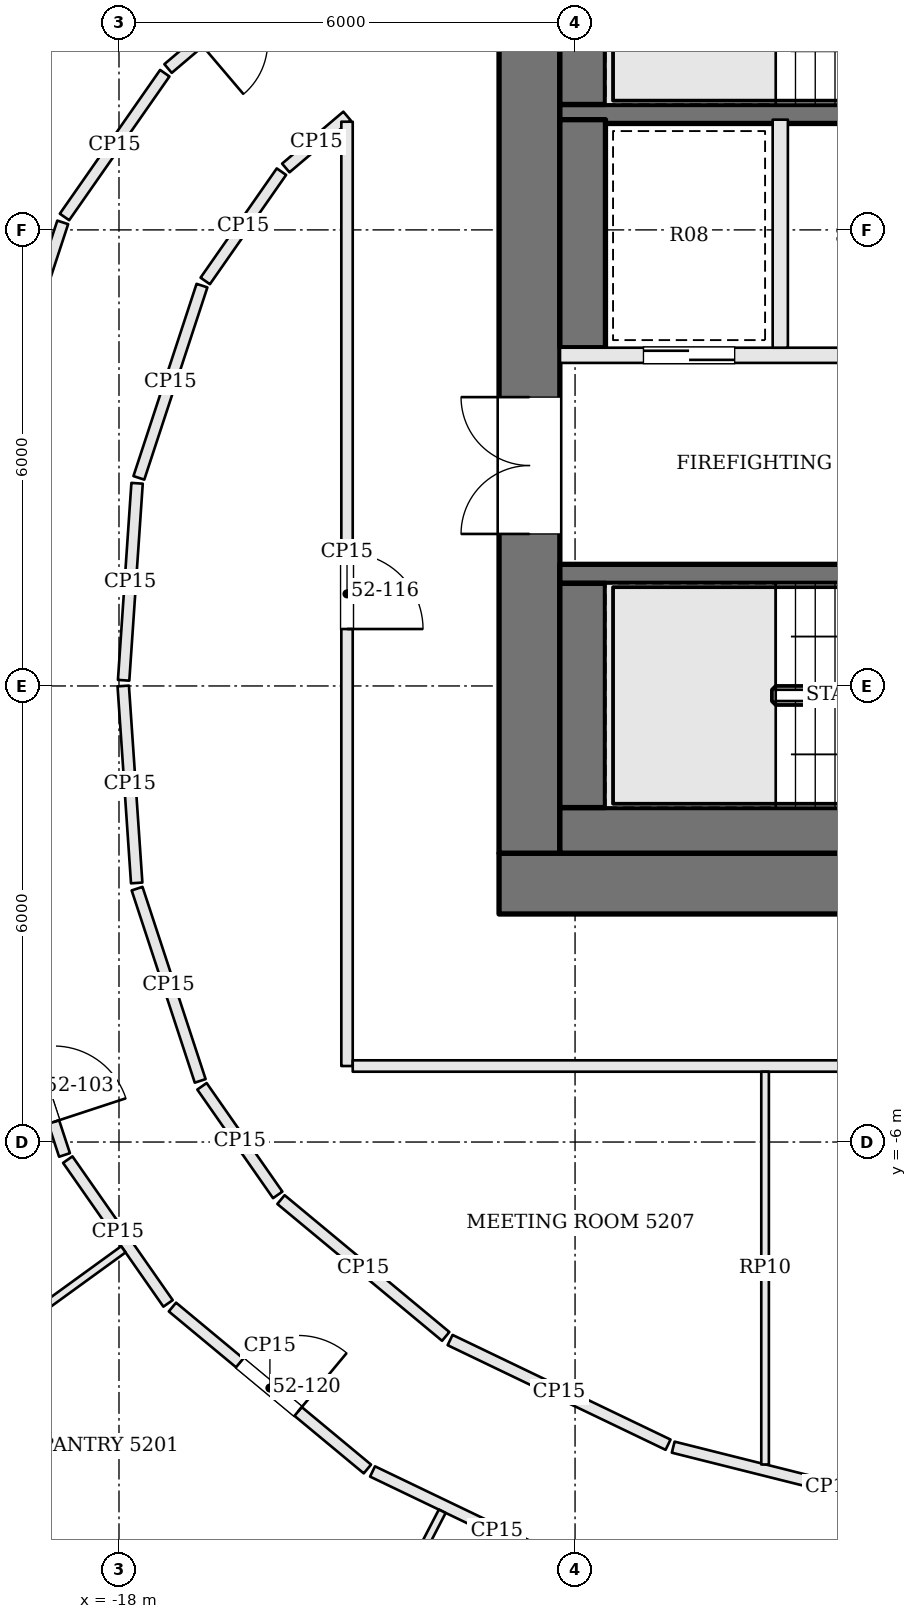
"""IFC4 building model, lengths in metres.
Left out: names, types, materials, properties, quantities, classifications, styles, units other than length and angle.
Written with IfcOpenShell. Run it as: python <this file> out.ifc"""

import sys

from ifc_helpers import new_model, si_unit, direction, frame, frame_2d, origin, place, context, subcontext, project, spatial, rectangle, extrude, element, fill, save


model = new_model("IFC4")
c1 = context("Model", 3, precision=1e-05, world=origin(), true_north=direction((0.0, 1.0)))
c2 = subcontext(c1, "Body", "Model", "MODEL_VIEW")
j1 = project(units=[si_unit("LENGTHUNIT", "METRE"), si_unit("PLANEANGLEUNIT", "RADIAN")], contexts=[c1])
p1 = place(None, origin())
s1 = spatial("IfcSite", under=j1, at=p1, CompositionType="ELEMENT")
p2 = place(p1, origin())
s2 = spatial("IfcBuilding", under=s1, at=p2, CompositionType="ELEMENT")
p3 = place(p2, frame((0.0, 0.0, 213.0)))
s3 = spatial("IfcBuildingStorey", under=s2, at=p3, CompositionType="ELEMENT", Elevation=213.0)
p4 = place(p3, frame((-13.0, -2.6, 0.0), z_axis=(0.0, 0.0, 1.0), x_axis=(1.0, 0.0, 0.0)))
e1 = element("IfcWall", 1, at=p4, inside=s3, PredefinedType="SHEAR", context=c2, shape_type="SweptSolid", body=[
    extrude(rectangle(XDim=26.0, YDim=0.8, at=frame_2d((13.0, 0.0))), origin(), (0.0, 0.0, 1.0), 3.9),
])
p5 = place(p4, frame((8.925, 0.0, 0.0)))
e2 = element("IfcOpeningElement", 2, at=p5, cuts=e1, PredefinedType="OPENING", context=c2, shape_type="SweptSolid", body=[
    extrude(rectangle(XDim=0.9, YDim=2.1, at=frame_2d((0.45, 1.05))), frame((0.0, 0.41, 0.0), z_axis=(0.0, -1.0, 0.0), x_axis=(1.0, 0.0, 0.0)), (0.0, 0.0, 1.0), 0.82),
])
p6 = place(p4, frame((11.475, 0.0, 0.0)))
e3 = element("IfcOpeningElement", 3, at=p6, cuts=e1, PredefinedType="OPENING", context=c2, shape_type="SweptSolid", body=[
    extrude(rectangle(XDim=0.9, YDim=2.1, at=frame_2d((0.45, 1.05))), frame((0.0, 0.41, 0.0), z_axis=(0.0, -1.0, 0.0), x_axis=(1.0, 0.0, 0.0)), (0.0, 0.0, 1.0), 0.82),
])
p7 = place(p4, frame((13.6, 0.0, 0.0)))
e4 = element("IfcOpeningElement", 4, at=p7, cuts=e1, PredefinedType="OPENING", context=c2, shape_type="SweptSolid", body=[
    extrude(rectangle(XDim=1.0, YDim=2.1, at=frame_2d((0.5, 1.05))), frame((0.0, 0.41, 0.0), z_axis=(0.0, -1.0, 0.0), x_axis=(1.0, 0.0, 0.0)), (0.0, 0.0, 1.0), 0.82),
])
p8 = place(p4, frame((15.95, 0.0, 0.0)))
e5 = element("IfcOpeningElement", 5, at=p8, cuts=e1, PredefinedType="OPENING", context=c2, shape_type="SweptSolid", body=[
    extrude(rectangle(XDim=1.0, YDim=2.1, at=frame_2d((0.5, 1.05))), frame((0.0, 0.41, 0.0), z_axis=(0.0, -1.0, 0.0), x_axis=(1.0, 0.0, 0.0)), (0.0, 0.0, 1.0), 0.82),
])
p9 = place(p3, frame((-12.6, -2.2, 0.0), z_axis=(0.0, 0.0, 1.0), x_axis=(0.0, 1.0, 0.0)))
e6 = element("IfcWall", 6, at=p9, inside=s3, PredefinedType="SHEAR", context=c2, shape_type="SweptSolid", body=[
    extrude(rectangle(XDim=13.4, YDim=0.8, at=frame_2d((6.7, 0.0))), origin(), (0.0, 0.0, 1.0), 3.9),
])
p10 = place(p9, frame((4.2, 0.0, 0.0)))
e7 = element("IfcOpeningElement", 7, at=p10, cuts=e6, PredefinedType="OPENING", context=c2, shape_type="SweptSolid", body=[
    extrude(rectangle(XDim=1.8, YDim=2.1, at=frame_2d((0.9, 1.05))), frame((0.0, 0.41, 0.0), z_axis=(0.0, -1.0, 0.0), x_axis=(1.0, 0.0, 0.0)), (0.0, 0.0, 1.0), 0.82),
])
p11 = place(p3, frame((-12.2, 1.475, 0.0), z_axis=(0.0, 0.0, 1.0), x_axis=(1.0, 0.0, 0.0)))
e8 = element("IfcWall", 8, at=p11, inside=s3, PredefinedType="SOLIDWALL", context=c2, shape_type="SweptSolid", body=[
    extrude(rectangle(XDim=7.1, YDim=0.25, at=frame_2d((3.55, 0.0))), origin(), (0.0, 0.0, 1.0), 3.6),
])
p12 = place(p11, frame((5.8, 0.0, 0.0)))
e9 = element("IfcOpeningElement", 9, at=p12, cuts=e8, PredefinedType="OPENING", context=c2, shape_type="SweptSolid", body=[
    extrude(rectangle(XDim=1.2, YDim=2.1, at=frame_2d((0.6, 1.05))), frame((0.0, 0.135, 0.0), z_axis=(0.0, -1.0, 0.0), x_axis=(1.0, 0.0, 0.0)), (0.0, 0.0, 1.0), 0.27),
])
p13 = place(p3, frame((-12.2, 4.35, 0.0), z_axis=(0.0, 0.0, 1.0), x_axis=(1.0, 0.0, 0.0)))
e10 = element("IfcWall", 10, at=p13, inside=s3, PredefinedType="SOLIDWALL", context=c2, shape_type="SweptSolid", body=[
    extrude(rectangle(XDim=7.1, YDim=0.2, at=frame_2d((3.55, 0.0))), origin(), (0.0, 0.0, 1.0), 3.6),
])
p14 = place(p13, frame((4.4, 0.0, 0.0)))
e11 = element("IfcOpeningElement", 11, at=p14, cuts=e10, PredefinedType="OPENING", context=c2, shape_type="SweptSolid", body=[
    extrude(rectangle(XDim=1.2, YDim=2.1, at=frame_2d((0.6, 1.05))), frame((0.0, 0.11, 0.0), z_axis=(0.0, -1.0, 0.0), x_axis=(1.0, 0.0, 0.0)), (0.0, 0.0, 1.0), 0.22),
])
p15 = place(p13, frame((1.1, 0.0, 0.0)))
e12 = element("IfcOpeningElement", 12, at=p15, cuts=e10, PredefinedType="OPENING", context=c2, shape_type="SweptSolid", body=[
    extrude(rectangle(XDim=1.2, YDim=2.1, at=frame_2d((0.6, 1.05))), frame((0.0, 0.11, 0.0), z_axis=(0.0, -1.0, 0.0), x_axis=(1.0, 0.0, 0.0)), (0.0, 0.0, 1.0), 0.22),
])
p16 = place(p3, frame((-12.2, 7.525, 0.0), z_axis=(0.0, 0.0, 1.0), x_axis=(1.0, 0.0, 0.0)))
e13 = element("IfcWall", 13, at=p16, inside=s3, PredefinedType="SOLIDWALL", context=c2, shape_type="SweptSolid", body=[
    extrude(rectangle(XDim=7.1, YDim=0.25, at=frame_2d((3.55, 0.0))), origin(), (0.0, 0.0, 1.0), 3.6),
])
p17 = place(p16, frame((5.8, 0.0, 0.0)))
e14 = element("IfcOpeningElement", 14, at=p17, cuts=e13, PredefinedType="OPENING", context=c2, shape_type="SweptSolid", body=[
    extrude(rectangle(XDim=1.2, YDim=2.1, at=frame_2d((0.6, 1.05))), frame((0.0, 0.135, 0.0), z_axis=(0.0, -1.0, 0.0), x_axis=(1.0, 0.0, 0.0)), (0.0, 0.0, 1.0), 0.27),
])
p18 = place(p3, frame((-9.3, 4.45, 0.0), z_axis=(0.0, 0.0, 1.0), x_axis=(0.0, 1.0, 0.0)))
e15 = element("IfcWall", 15, at=p18, inside=s3, PredefinedType="SOLIDWALL", context=c2, shape_type="SweptSolid", body=[
    extrude(rectangle(XDim=3.0, YDim=0.2, at=frame_2d((1.5, 0.0))), origin(), (0.0, 0.0, 1.0), 3.6),
])
p19 = place(p3, frame((-12.2, -1.9, 0.0), z_axis=(0.0, 0.0, 1.0), x_axis=(1.0, 0.0, 0.0)))
e16 = element("IfcWall", 16, at=p19, inside=s3, PredefinedType="SOLIDWALL", context=c2, shape_type="SweptSolid", body=[
    extrude(rectangle(XDim=7.1, YDim=0.6, at=frame_2d((3.55, 0.0))), origin(), (0.0, 0.0, 1.0), 3.6),
])
p20 = place(p3, frame((-11.9, -1.6, 0.0), z_axis=(0.0, 0.0, 1.0), x_axis=(0.0, 1.0, 0.0)))
e17 = element("IfcWall", 17, at=p20, inside=s3, PredefinedType="SOLIDWALL", context=c2, shape_type="SweptSolid", body=[
    extrude(rectangle(XDim=2.95, YDim=0.6, at=frame_2d((1.475, 0.0))), origin(), (0.0, 0.0, 1.0), 3.6),
])
p21 = place(p3, frame((-11.9, 4.45, 0.0), z_axis=(0.0, 0.0, 1.0), x_axis=(0.0, 1.0, 0.0)))
e18 = element("IfcWall", 18, at=p21, inside=s3, PredefinedType="SOLIDWALL", context=c2, shape_type="SweptSolid", body=[
    extrude(rectangle(XDim=3.0, YDim=0.6, at=frame_2d((1.5, 0.0))), origin(), (0.0, 0.0, 1.0), 3.6),
])
p22 = place(p3, frame((-11.9, 7.65, 0.0), z_axis=(0.0, 0.0, 1.0), x_axis=(0.0, 1.0, 0.0)))
e19 = element("IfcWall", 19, at=p22, inside=s3, PredefinedType="SOLIDWALL", context=c2, shape_type="SweptSolid", body=[
    extrude(rectangle(XDim=2.95, YDim=0.6, at=frame_2d((1.475, 0.0))), origin(), (0.0, 0.0, 1.0), 3.6),
])
p23 = place(p3, frame((-15.057, 10.073, 0.0), z_axis=(0.0, 0.0, 1.0), x_axis=(-0.762398905861, -0.647107339119, 0.0)))
e20 = element("IfcWall", 20, at=p23, inside=s3, PredefinedType="PARTITIONING", context=c2, shape_type="SweptSolid", body=[
    extrude(rectangle(XDim=3.013, YDim=0.15, at=frame_2d((1.507, 0.0))), origin(), (0.0, 0.0, 1.0), 2.984),
])
p24 = place(p23, frame((0.675, 0.0, 0.0)))
e21 = element("IfcOpeningElement", 21, at=p24, cuts=e20, PredefinedType="OPENING", context=c2, shape_type="SweptSolid", body=[
    extrude(rectangle(XDim=1.8, YDim=2.1, at=frame_2d((0.9, 1.05))), frame((0.0, 0.085, 0.0), z_axis=(0.0, -1.0, 0.0), x_axis=(1.0, 0.0, 0.0)), (0.0, 0.0, 1.0), 0.17),
])
p25 = place(p3, frame((-17.397, 8.062, 0.0), z_axis=(0.0, 0.0, 1.0), x_axis=(-0.572118665737, -0.820170855563, 0.0)))
e22 = element("IfcWall", 22, at=p25, inside=s3, PredefinedType="PARTITIONING", context=c2, shape_type="SweptSolid", body=[
    extrude(rectangle(XDim=2.306, YDim=0.15, at=frame_2d((1.153, 0.0))), origin(), (0.0, 0.0, 1.0), 2.984),
])
p26 = place(p3, frame((-18.74, 6.099, 0.0), z_axis=(0.0, 0.0, 1.0), x_axis=(-0.31188427026, -0.950120098706, 0.0)))
e23 = element("IfcWall", 23, at=p26, inside=s3, PredefinedType="PARTITIONING", context=c2, shape_type="SweptSolid", body=[
    extrude(rectangle(XDim=3.206, YDim=0.15, at=frame_2d((1.603, 0.0))), origin(), (0.0, 0.0, 1.0), 2.984),
])
p27 = place(p3, frame((-19.717, -3.124, 0.0), z_axis=(0.0, 0.0, 1.0), x_axis=(0.31188427026, -0.950120098706, 0.0)))
e24 = element("IfcWall", 24, at=p27, inside=s3, PredefinedType="PARTITIONING", context=c2, shape_type="SweptSolid", body=[
    extrude(rectangle(XDim=3.206, YDim=0.15, at=frame_2d((1.603, 0.0))), origin(), (0.0, 0.0, 1.0), 2.984),
])
p28 = place(p27, frame((1.75, 0.0, 0.0)))
e25 = element("IfcOpeningElement", 25, at=p28, cuts=e24, PredefinedType="OPENING", context=c2, shape_type="SweptSolid", body=[
    extrude(rectangle(XDim=1.0, YDim=2.4, at=frame_2d((0.5, 1.2))), frame((0.0, 0.085, 0.0), z_axis=(0.0, -1.0, 0.0), x_axis=(1.0, 0.0, 0.0)), (0.0, 0.0, 1.0), 0.17),
])
p29 = place(p3, frame((-18.674, -6.232, 0.0), z_axis=(0.0, 0.0, 1.0), x_axis=(0.572118665737, -0.820170855563, 0.0)))
e26 = element("IfcWall", 26, at=p29, inside=s3, PredefinedType="PARTITIONING", context=c2, shape_type="SweptSolid", body=[
    extrude(rectangle(XDim=2.306, YDim=0.15, at=frame_2d((1.153, 0.0))), origin(), (0.0, 0.0, 1.0), 2.984),
])
p30 = place(p3, frame((-17.297, -8.171, 0.0), z_axis=(0.0, 0.0, 1.0), x_axis=(0.769228575061, -0.638973707839, 0.0)))
e27 = element("IfcWall", 27, at=p30, inside=s3, PredefinedType="PARTITIONING", context=c2, shape_type="SweptSolid", body=[
    extrude(rectangle(XDim=3.334, YDim=0.15, at=frame_2d((1.667, 0.0))), origin(), (0.0, 0.0, 1.0), 2.984),
])
p31 = place(p30, frame((1.15, 0.0, 0.0)))
e28 = element("IfcOpeningElement", 28, at=p31, cuts=e27, PredefinedType="OPENING", context=c2, shape_type="SweptSolid", body=[
    extrude(rectangle(XDim=1.0, YDim=2.1, at=frame_2d((0.5, 1.05))), frame((0.0, 0.085, 0.0), z_axis=(0.0, -1.0, 0.0), x_axis=(1.0, 0.0, 0.0)), (0.0, 0.0, 1.0), 0.17),
])
p32 = place(p3, frame((-14.664, -10.334, 0.0), z_axis=(0.0, 0.0, 1.0), x_axis=(0.901507315282, -0.432763862278, 0.0)))
e29 = element("IfcWall", 29, at=p32, inside=s3, PredefinedType="PARTITIONING", context=c2, shape_type="SweptSolid", body=[
    extrude(rectangle(XDim=3.63, YDim=0.15, at=frame_2d((1.815, 0.0))), origin(), (0.0, 0.0, 1.0), 2.984),
])
p33 = place(p3, frame((-6.553, -11.056, 0.0), z_axis=(0.0, 0.0, 1.0), x_axis=(-0.970004917182, 0.243085294995, 0.0)))
e30 = element("IfcWall", 30, at=p33, inside=s3, PredefinedType="PARTITIONING", context=c2, shape_type="SweptSolid", body=[
    extrude(rectangle(XDim=4.284, YDim=0.15, at=frame_2d((2.142, 0.0))), origin(), (0.0, 0.0, 1.0), 2.984),
])
p34 = place(p3, frame((-10.776, -9.982, 0.0), z_axis=(0.0, 0.0, 1.0), x_axis=(-0.901511079436, 0.432756020933, 0.0)))
e31 = element("IfcWall", 31, at=p34, inside=s3, PredefinedType="PARTITIONING", context=c2, shape_type="SweptSolid", body=[
    extrude(rectangle(XDim=3.181, YDim=0.15, at=frame_2d((1.59, 0.0))), origin(), (0.0, 0.0, 1.0), 2.984),
])
p35 = place(p3, frame((-13.702, -8.557, 0.0), z_axis=(0.0, 0.0, 1.0), x_axis=(-0.769221825067, 0.638981833733, 0.0)))
e32 = element("IfcWall", 32, at=p35, inside=s3, PredefinedType="PARTITIONING", context=c2, shape_type="SweptSolid", body=[
    extrude(rectangle(XDim=2.817, YDim=0.15, at=frame_2d((1.409, 0.0))), origin(), (0.0, 0.0, 1.0), 2.984),
])
p36 = place(p3, frame((-15.912, -6.696, 0.0), z_axis=(0.0, 0.0, 1.0), x_axis=(-0.572078533763, 0.820198848578, 0.0)))
e33 = element("IfcWall", 33, at=p36, inside=s3, PredefinedType="PARTITIONING", context=c2, shape_type="SweptSolid", body=[
    extrude(rectangle(XDim=1.742, YDim=0.15, at=frame_2d((0.871, 0.0))), origin(), (0.0, 0.0, 1.0), 2.984),
])
p37 = place(p3, frame((-16.932, -5.196, 0.0), z_axis=(0.0, 0.0, 1.0), x_axis=(-0.311904957484, 0.950113307715, 0.0)))
e34 = element("IfcWall", 34, at=p37, inside=s3, PredefinedType="PARTITIONING", context=c2, shape_type="SweptSolid", body=[
    extrude(rectangle(XDim=2.662, YDim=0.15, at=frame_2d((1.331, 0.0))), origin(), (0.0, 0.0, 1.0), 2.984),
])
p38 = place(p3, frame((-17.767, -2.592, 0.0), z_axis=(0.0, 0.0, 1.0), x_axis=(-0.068140828228, 0.997675712608, 0.0)))
e35 = element("IfcWall", 35, at=p38, inside=s3, PredefinedType="PARTITIONING", context=c2, shape_type="SweptSolid", body=[
    extrude(rectangle(XDim=2.598, YDim=0.15, at=frame_2d((1.299, 0.0))), origin(), (0.0, 0.0, 1.0), 2.984),
])
p39 = place(p3, frame((-17.939, 0.075, 0.0), z_axis=(0.0, 0.0, 1.0), x_axis=(0.068227980697, 0.997669756307, 0.0)))
e36 = element("IfcWall", 36, at=p39, inside=s3, PredefinedType="PARTITIONING", context=c2, shape_type="SweptSolid", body=[
    extrude(rectangle(XDim=2.598, YDim=0.15, at=frame_2d((1.299, 0.0))), origin(), (0.0, 0.0, 1.0), 2.984),
])
p40 = place(p3, frame((-17.739, 2.738, 0.0), z_axis=(0.0, 0.0, 1.0), x_axis=(0.311904957484, 0.950113307715, 0.0)))
e37 = element("IfcWall", 37, at=p40, inside=s3, PredefinedType="PARTITIONING", context=c2, shape_type="SweptSolid", body=[
    extrude(rectangle(XDim=2.662, YDim=0.15, at=frame_2d((1.331, 0.0))), origin(), (0.0, 0.0, 1.0), 2.984),
])
p41 = place(p3, frame((-16.865, 5.329, 0.0), z_axis=(0.0, 0.0, 1.0), x_axis=(0.572096615639, 0.820186236397, 0.0)))
e38 = element("IfcWall", 38, at=p41, inside=s3, PredefinedType="PARTITIONING", context=c2, shape_type="SweptSolid", body=[
    extrude(rectangle(XDim=1.753, YDim=0.15, at=frame_2d((0.876, 0.0))), origin(), (0.0, 0.0, 1.0), 2.984),
])
p42 = place(p3, frame((-15.805, 6.814, 0.0), z_axis=(0.0, 0.0, 1.0), x_axis=(0.762298381233, 0.647225755027, 0.0)))
e39 = element("IfcWall", 39, at=p42, inside=s3, PredefinedType="PARTITIONING", context=c2, shape_type="SweptSolid", body=[
    extrude(rectangle(XDim=1.057, YDim=0.15, at=frame_2d((0.528, 0.0))), origin(), (0.0, 0.0, 1.0), 2.984),
])
p43 = place(p3, frame((-15.0, 7.423, 0.0), z_axis=(0.0, 0.0, 1.0), x_axis=(0.0, -1.0, 0.0)))
e40 = element("IfcWall", 40, at=p43, inside=s3, PredefinedType="PARTITIONING", context=c2, shape_type="SweptSolid", body=[
    extrude(rectangle(XDim=12.423, YDim=0.15, at=frame_2d((6.211, 0.0))), origin(), (0.0, 0.0, 1.0), 2.984),
])
p44 = place(p43, frame((5.674, 0.0, 0.0)))
e41 = element("IfcOpeningElement", 41, at=p44, cuts=e40, PredefinedType="OPENING", context=c2, shape_type="SweptSolid", body=[
    extrude(rectangle(XDim=1.0, YDim=2.4, at=frame_2d((0.5, 1.2))), frame((0.0, 0.085, 0.0), z_axis=(0.0, -1.0, 0.0), x_axis=(1.0, 0.0, 0.0)), (0.0, 0.0, 1.0), 0.17),
])
p45 = place(p3, frame((-14.925, -5.0, 0.0), z_axis=(0.0, 0.0, 1.0), x_axis=(1.0, 0.0, 0.0)))
e42 = element("IfcWall", 42, at=p45, inside=s3, PredefinedType="PARTITIONING", context=c2, shape_type="SweptSolid", body=[
    extrude(rectangle(XDim=29.925, YDim=0.15, at=frame_2d((14.962, 0.0))), origin(), (0.0, 0.0, 1.0), 2.984),
])
p46 = place(p45, frame((14.025, 0.0, 0.0)))
e43 = element("IfcOpeningElement", 43, at=p46, cuts=e42, PredefinedType="OPENING", context=c2, shape_type="SweptSolid", body=[
    extrude(rectangle(XDim=1.8, YDim=2.1, at=frame_2d((0.9, 1.05))), frame((0.0, 0.085, 0.0), z_axis=(0.0, -1.0, 0.0), x_axis=(1.0, 0.0, 0.0)), (0.0, 0.0, 1.0), 0.17),
])
p47 = place(p3, frame((-16.838, -13.492, 0.0), z_axis=(0.0, 0.0, 1.0), x_axis=(-0.769220564036, 0.63898335179, 0.0)))
e44 = element("IfcWall", 44, at=p47, inside=s3, PredefinedType="PARTITIONING", context=c2, shape_type="SweptSolid", body=[
    extrude(rectangle(XDim=4.342, YDim=0.1, at=frame_2d((2.171, 0.0))), origin(), (0.0, 0.0, 1.0), 2.984),
])
p48 = place(p3, frame((-17.942, -7.412, 0.0), z_axis=(0.0, 0.0, 1.0), x_axis=(-0.809416276525, -0.587235294662, 0.0)))
e45 = element("IfcWall", 45, at=p48, inside=s3, PredefinedType="PARTITIONING", context=c2, shape_type="SweptSolid", body=[
    extrude(rectangle(XDim=3.676, YDim=0.1, at=frame_2d((1.838, 0.0))), origin(), (0.0, 0.0, 1.0), 2.984),
])
p49 = place(p3, frame((-13.747, -10.857, 0.0), z_axis=(0.0, 0.0, 1.0), x_axis=(-0.460154350261, -0.887838934681, 0.0)))
e46 = element("IfcWall", 46, at=p49, inside=s3, PredefinedType="PARTITIONING", context=c2, shape_type="SweptSolid", body=[
    extrude(rectangle(XDim=3.677, YDim=0.1, at=frame_2d((1.838, 0.0))), origin(), (0.0, 0.0, 1.0), 2.984),
])
p50 = place(p3, frame((-9.5, -10.242, 0.0), z_axis=(0.0, 0.0, 1.0), x_axis=(0.0, 1.0, 0.0)))
e47 = element("IfcWall", 47, at=p50, inside=s3, PredefinedType="PARTITIONING", context=c2, shape_type="SweptSolid", body=[
    extrude(rectangle(XDim=5.167, YDim=0.1, at=frame_2d((2.583, 0.0))), origin(), (0.0, 0.0, 1.0), 2.984),
])
p51 = place(p10, origin())
e48 = element("IfcDoor", 48, at=p51, inside=s3, OperationType="DOUBLE_DOOR_SINGLE_SWING", PredefinedType="DOOR", context=c2, shape_type="SweptSolid", body=[
    extrude(rectangle(XDim=1.8, YDim=2.1, at=frame_2d((0.9, 1.05))), frame((0.0, 0.025, 0.0), z_axis=(0.0, -1.0, 0.0), x_axis=(1.0, 0.0, 0.0)), (0.0, 0.0, 1.0), 0.05),
])
fill(e7, e48)
p52 = place(p15, origin())
e49 = element("IfcDoor", 49, at=p52, inside=s3, OperationType="SLIDING_TO_RIGHT", PredefinedType="DOOR", context=c2, shape_type="SweptSolid", body=[
    extrude(rectangle(XDim=1.2, YDim=2.1, at=frame_2d((0.6, 1.05))), frame((0.0, 0.025, 0.0), z_axis=(0.0, -1.0, 0.0), x_axis=(1.0, 0.0, 0.0)), (0.0, 0.0, 1.0), 0.05),
])
fill(e12, e49)
p53 = place(p28, origin())
e50 = element("IfcDoor", 50, at=p53, inside=s3, OperationType="SINGLE_SWING_RIGHT", PredefinedType="DOOR", context=c2, shape_type="SweptSolid", body=[
    extrude(rectangle(XDim=1.0, YDim=2.4, at=frame_2d((0.5, 1.2))), frame((0.0, 0.025, 0.0), z_axis=(0.0, -1.0, 0.0), x_axis=(1.0, 0.0, 0.0)), (0.0, 0.0, 1.0), 0.05),
])
fill(e25, e50)
p54 = place(p44, origin())
e51 = element("IfcDoor", 51, at=p54, inside=s3, OperationType="SINGLE_SWING_RIGHT", PredefinedType="DOOR", context=c2, shape_type="SweptSolid", body=[
    extrude(rectangle(XDim=1.0, YDim=2.4, at=frame_2d((0.5, 1.2))), frame((0.0, 0.025, 0.0), z_axis=(0.0, -1.0, 0.0), x_axis=(1.0, 0.0, 0.0)), (0.0, 0.0, 1.0), 0.05),
])
fill(e41, e51)
p55 = place(p31, origin())
e52 = element("IfcDoor", 52, at=p55, inside=s3, OperationType="SINGLE_SWING_RIGHT", PredefinedType="DOOR", context=c2, shape_type="SweptSolid", body=[
    extrude(rectangle(XDim=1.0, YDim=2.1, at=frame_2d((0.5, 1.05))), frame((0.0, 0.025, 0.0), z_axis=(0.0, -1.0, 0.0), x_axis=(1.0, 0.0, 0.0)), (0.0, 0.0, 1.0), 0.05),
])
fill(e28, e52)
save(model, sys.argv[1])
